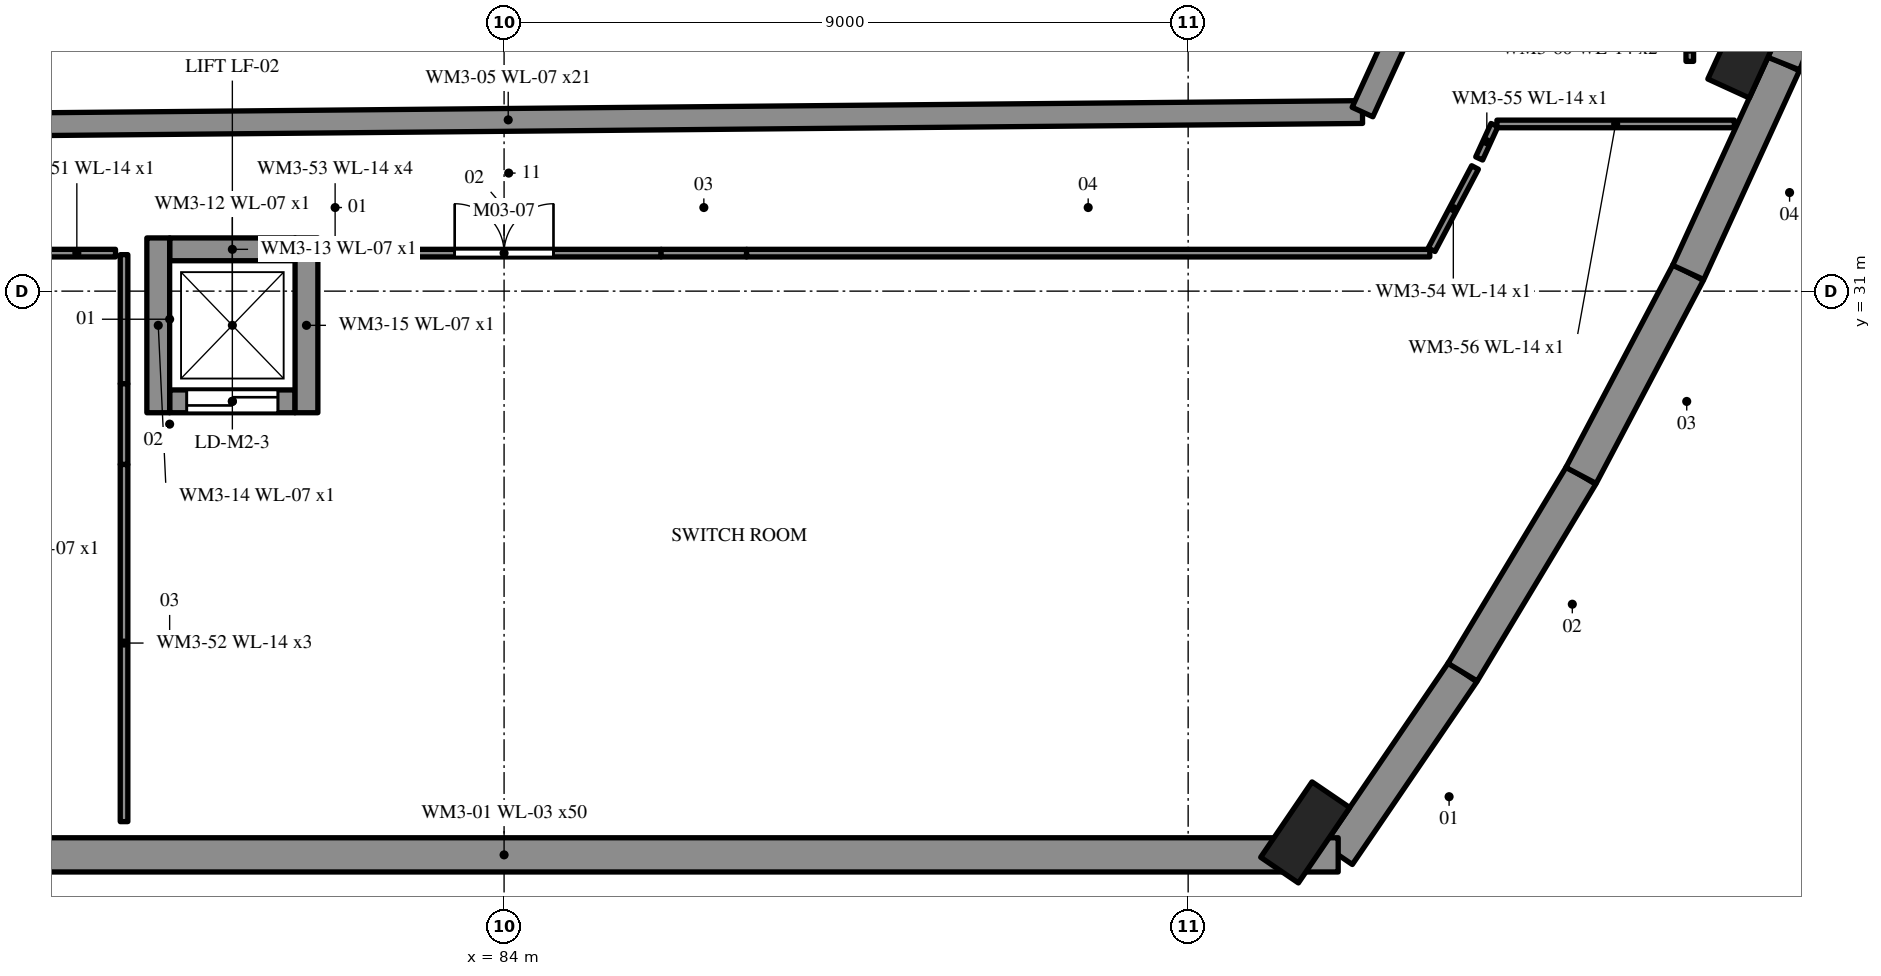
"""IFC4 building model, lengths in metres.
Left out: names, types, materials, properties, quantities, classifications, styles, units other than length and angle.
Written with IfcOpenShell. Run it as: python <this file> out.ifc"""

import sys

from ifc_helpers import new_model, si_unit, direction, frame, frame_2d, origin, origin_2d, place, context, subcontext, project, spatial, polyline, rectangle, outline, extrude, element, fill, save


model = new_model("IFC4")
c1 = context("Model", 3, precision=1e-05, world=origin(), true_north=direction((0.0, 1.0)))
c2 = subcontext(c1, "Body", "Model", "MODEL_VIEW")
j1 = project(units=[si_unit("LENGTHUNIT", "METRE"), si_unit("PLANEANGLEUNIT", "RADIAN")], contexts=[c1])
p1 = place(None, origin())
s1 = spatial("IfcSite", under=j1, at=p1, CompositionType="ELEMENT")
p2 = place(p1, origin())
s2 = spatial("IfcBuilding", under=s1, at=p2, CompositionType="ELEMENT")
p3 = place(p2, frame((0.0, 0.0, 14.8)))
s3 = spatial("IfcBuildingStorey", under=s2, at=p3, CompositionType="ELEMENT", Elevation=14.8)
p4 = place(p3, frame((94.974, 23.583, 0.0), z_axis=(0.0, 0.0, 1.0), x_axis=(0.5629642644, 0.826481238147, 0.0)))
e1 = element("IfcWall", 1, at=p4, inside=s3, PredefinedType="SOLIDWALL", context=c2, shape_type="SweptSolid", body=[
    extrude(outline(polyline([(0.0, 0.0), (2.908, 0.0), (2.908, 2.949), (0.086, 3.823), (0.0, 3.849), (0.0, 0.0)])), frame((0.0, 0.225, 0.0), z_axis=(0.0, -1.0, 0.0), x_axis=(1.0, 0.0, 0.0)), (0.0, 0.0, 1.0), 0.45),
])
p5 = place(p3, frame((96.611, 25.986, 0.0), z_axis=(0.0, 0.0, 1.0), x_axis=(0.515636119523, 0.856807675177, 0.0)))
e2 = element("IfcWall", 2, at=p5, inside=s3, PredefinedType="SOLIDWALL", context=c2, shape_type="SweptSolid", body=[
    extrude(outline(polyline([(0.0, 0.0), (3.021, 0.0), (3.021, 2.045), (2.981, 2.057), (0.0, 2.945), (0.0, 0.0)])), frame((0.0, 0.225, 0.0), z_axis=(0.0, -1.0, 0.0), x_axis=(1.0, 0.0, 0.0)), (0.0, 0.0, 1.0), 0.45),
])
p6 = place(p3, frame((98.169, 28.575, 0.0), z_axis=(0.0, 0.0, 1.0), x_axis=(0.466728769487, 0.884400506407, 0.0)))
e3 = element("IfcWall", 3, at=p6, inside=s3, PredefinedType="SOLIDWALL", context=c2, shape_type="SweptSolid", body=[
    extrude(outline(polyline([(0.0, 0.0), (3.021, 0.0), (3.021, 2.917), (2.948, 2.896), (0.0, 2.041), (0.0, 0.0)])), frame((0.0, 0.225, 0.0), z_axis=(0.0, -1.0, 0.0), x_axis=(1.0, 0.0, 0.0)), (0.0, 0.0, 1.0), 0.45),
])
p7 = place(p3, frame((99.579, 31.246, 0.0), z_axis=(0.0, 0.0, 1.0), x_axis=(0.416407051835, 0.909178292296, 0.0)))
e4 = element("IfcWall", 4, at=p7, inside=s3, PredefinedType="SOLIDWALL", context=c2, shape_type="SweptSolid", body=[
    extrude(outline(polyline([(0.0, 0.0), (3.021, 0.0), (3.021, 3.826), (2.922, 3.796), (2.819, 3.766), (0.059, 2.941), (0.0, 2.921), (0.0, 0.0)])), frame((0.0, 0.225, 0.0), z_axis=(0.0, -1.0, 0.0), x_axis=(1.0, 0.0, 0.0)), (0.0, 0.0, 1.0), 0.45),
])
p8 = place(p3, frame((100.837, 33.993, 0.0), z_axis=(0.0, 0.0, 1.0), x_axis=(0.366920100653, 0.930252460215, 0.0)))
e5 = element("IfcWall", 5, at=p8, inside=s3, PredefinedType="SOLIDWALL", context=c2, shape_type="SweptSolid", body=[
    extrude(outline(polyline([(0.0, 0.0), (2.752, 0.0), (2.752, 3.009), (2.624, 3.051), (0.186, 3.848), (0.097, 3.877), (0.0, 3.83), (0.0, 0.0)])), frame((0.0, 0.225, 0.0), z_axis=(0.0, -1.0, 0.0), x_axis=(1.0, 0.0, 0.0)), (0.0, 0.0, 1.0), 0.45),
])
p9 = place(p3, frame((73.026, 23.583, 0.0), z_axis=(0.0, 0.0, 1.0), x_axis=(1.0, 0.0, 0.0)))
e6 = element("IfcWall", 6, at=p9, inside=s3, PredefinedType="SOLIDWALL", context=c2, shape_type="SweptSolid", body=[
    extrude(outline(polyline([(0.0, 0.0), (21.948, 0.0), (21.948, 3.808), (21.824, 3.808), (21.587, 3.808), (0.361, 3.808), (0.114, 3.808), (0.0, 3.808), (0.0, 0.0)])), frame((0.0, 0.225, 0.0), z_axis=(0.0, -1.0, 0.0), x_axis=(1.0, 0.0, 0.0)), (0.0, 0.0, 1.0), 0.45),
])
p10 = place(p3, frame((72.815, 33.15, 0.0), z_axis=(0.0, 0.0, 1.0), x_axis=(0.999957788763, 0.009188073348, 0.0)))
e7 = element("IfcWall", 7, at=p10, inside=s3, PredefinedType="SHEAR", context=c2, shape_type="SweptSolid", body=[
    extrude(outline(polyline([(0.0, 0.0), (22.479, 0.0), (22.479, 5.858), (15.985, 8.528), (15.177, 8.853), (14.37, 9.179), (13.458, 9.548), (13.076, 9.791), (12.695, 10.024), (12.567, 10.103), (12.335, 10.244), (12.236, 10.303), (12.081, 10.37), (11.991, 10.369), (11.926, 10.369), (11.836, 10.368), (11.681, 10.367), (10.683, 10.361), (10.522, 10.36), (10.433, 10.359), (10.361, 10.359), (10.243, 10.358), (10.111, 10.29), (10.002, 10.224), (9.76, 10.078), (9.604, 9.978), (9.201, 9.734), (8.798, 9.479), (7.653, 9.004), (6.754, 8.631), (5.855, 8.258), (0.0, 5.797), (0.0, 0.0)])), frame((0.0, 0.15, 0.0), z_axis=(0.0, -1.0, 0.0), x_axis=(1.0, 0.0, 0.0)), (0.0, 0.0, 1.0), 0.3),
])
p11 = place(p3, frame((95.294, 33.356, 0.0), z_axis=(0.0, 0.0, 1.0), x_axis=(0.416368255987, 0.909196059938, 0.0)))
e8 = element("IfcWall", 8, at=p11, inside=s3, PredefinedType="SHEAR", context=c2, shape_type="SweptSolid", body=[
    extrude(outline(polyline([(0.0, 0.0), (2.759, 0.0), (2.759, 5.412), (2.657, 5.448), (2.56, 5.481), (0.869, 6.062), (0.8, 6.086), (0.731, 6.065), (0.669, 6.046), (0.601, 6.026), (0.532, 6.005), (0.0, 5.847), (0.0, 0.0)])), frame((0.0, 0.15, 0.0), z_axis=(0.0, -1.0, 0.0), x_axis=(1.0, 0.0, 0.0)), (0.0, 0.0, 1.0), 0.3),
])
p12 = place(p3, frame((94.54, 23.878, 0.0), z_axis=(0.0, 0.0, 1.0), x_axis=(0.562978035902, 0.82647185741, 0.0)))
e9 = element("IfcColumn", 9, at=p12, inside=s3, PredefinedType="PILASTER", context=c2, shape_type="SweptSolid", body=[
    extrude(rectangle(XDim=1.2, YDim=0.6, at=origin_2d()), origin(), (0.0, 0.0, 1.0), 3.059),
])
p13 = place(p3, frame((100.36, 34.212, 0.0), z_axis=(0.0, 0.0, 1.0), x_axis=(0.416344267901, 0.90920704495, 0.0)))
e10 = element("IfcColumn", 10, at=p13, inside=s3, PredefinedType="PILASTER", context=c2, shape_type="SweptSolid", body=[
    extrude(rectangle(XDim=1.2, YDim=0.6, at=origin_2d()), origin(), (0.0, 0.0, 1.0), 3.06),
])
p14 = place(p3, frame((79.6, 29.55, 0.0), z_axis=(0.0, 0.0, 1.0), x_axis=(1.0, 0.0, 0.0)))
e11 = element("IfcWall", 11, at=p14, inside=s3, PredefinedType="SHEAR", context=c2, shape_type="SweptSolid", body=[
    extrude(rectangle(XDim=1.65, YDim=0.3, at=frame_2d((0.825, 0.0))), origin(), (0.0, 0.0, 1.0), 4.2),
])
p15 = place(p14, frame((0.225, 0.0, 0.0)))
e12 = element("IfcOpeningElement", 12, at=p15, cuts=e11, PredefinedType="OPENING", context=c2, shape_type="SweptSolid", body=[
    extrude(rectangle(XDim=1.2, YDim=2.2, at=frame_2d((0.6, 1.1))), frame((0.0, 0.16, 0.0), z_axis=(0.0, -1.0, 0.0), x_axis=(1.0, 0.0, 0.0)), (0.0, 0.0, 1.0), 0.32),
])
p16 = place(p3, frame((81.25, 31.55, 0.0), z_axis=(0.0, 0.0, 1.0), x_axis=(-1.0, 0.0, 0.0)))
e13 = element("IfcWall", 13, at=p16, inside=s3, PredefinedType="SHEAR", context=c2, shape_type="SweptSolid", body=[
    extrude(rectangle(XDim=1.65, YDim=0.3, at=frame_2d((0.825, 0.0))), origin(), (0.0, 0.0, 1.0), 4.2),
])
for number, where, z_axis, x_axis in (
    (14, (79.45, 31.7, 0.0), (0.0, 0.0, 1.0), (0.0, -1.0, 0.0)),
    (15, (81.4, 29.4, 0.0), (0.0, 0.0, 1.0), (0.0, 1.0, 0.0)),
):
    element("IfcWall", number, at=place(p3, frame(where, z_axis=z_axis, x_axis=x_axis)), inside=s3, PredefinedType="SHEAR", context=c2, shape_type="SweptSolid", body=[
        extrude(rectangle(XDim=2.3, YDim=0.3, at=frame_2d((1.15, 0.0))), origin(), (0.0, 0.0, 1.0), 4.2),
    ])
p17 = place(p3, frame((77.87, 31.5, 0.0), z_axis=(0.0, 0.0, 1.0), x_axis=(1.0, 0.0, 0.0)))
e16 = element("IfcWall", 16, at=p17, inside=s3, PredefinedType="PARTITIONING", context=c2, shape_type="SweptSolid", body=[
    extrude(outline(polyline([(0.0, 0.0), (1.018, 0.0), (1.018, 7.732), (0.763, 7.576), (0.509, 7.42), (0.254, 7.264), (0.0, 7.108), (0.0, 0.0)])), frame((0.0, 0.05, 0.0), z_axis=(0.0, -1.0, 0.0), x_axis=(1.0, 0.0, 0.0)), (0.0, 0.0, 1.0), 0.1),
])
p18 = place(p3, frame((79.0, 31.48, 0.0), z_axis=(0.0, 0.0, 1.0), x_axis=(0.0, -1.0, 0.0)))
e17 = element("IfcWall", 17, at=p18, inside=s3, PredefinedType="PARTITIONING", context=c2, shape_type="SweptSolid", body=[
    extrude(outline(polyline([(0.0, 0.0), (1.699, 0.0), (1.699, 7.749), (1.416, 7.759), (1.133, 7.77), (0.85, 7.78), (0.566, 7.788), (0.283, 7.794), (0.0, 7.8), (0.0, 0.0)])), frame((0.0, 0.05, 0.0), z_axis=(0.0, -1.0, 0.0), x_axis=(1.0, 0.0, 0.0)), (0.0, 0.0, 1.0), 0.1),
])
p19 = place(p3, frame((79.0, 29.781, 0.0), z_axis=(0.0, 0.0, 1.0), x_axis=(0.0, -1.0, 0.0)))
e18 = element("IfcWall", 18, at=p19, inside=s3, PredefinedType="PARTITIONING", context=c2, shape_type="SweptSolid", body=[
    extrude(rectangle(XDim=1.062, YDim=0.1, at=frame_2d((0.531, 0.0))), origin(), (0.0, 0.0, 1.0), 2.008),
])
p20 = place(p3, frame((79.0, 28.719, 0.0), z_axis=(0.0, 0.0, 1.0), x_axis=(0.0, -1.0, 0.0)))
e19 = element("IfcWall", 19, at=p20, inside=s3, PredefinedType="PARTITIONING", context=c2, shape_type="SweptSolid", body=[
    extrude(outline(polyline([(0.0, 0.0), (4.699, 0.0), (4.699, 4.203), (4.438, 4.379), (4.177, 4.555), (3.916, 4.73), (3.655, 4.906), (3.394, 5.081), (3.133, 5.257), (2.872, 5.433), (2.611, 5.608), (2.35, 5.784), (2.089, 5.96), (1.827, 6.135), (1.566, 6.311), (1.305, 6.487), (1.044, 6.662), (0.783, 6.838), (0.522, 7.014), (0.261, 7.189), (0.0, 7.365), (0.0, 0.0)])), frame((0.0, 0.05, 0.0), z_axis=(0.0, -1.0, 0.0), x_axis=(1.0, 0.0, 0.0)), (0.0, 0.0, 1.0), 0.1),
])
p21 = place(p3, frame((81.62, 31.5, 0.0), z_axis=(0.0, 0.0, 1.0), x_axis=(1.0, 0.0, 0.0)))
e20 = element("IfcWall", 20, at=p21, inside=s3, PredefinedType="PARTITIONING", context=c2, shape_type="SweptSolid", body=[
    extrude(rectangle(XDim=0.314, YDim=0.1, at=frame_2d((0.157, 0.0))), origin(), (0.0, 0.0, 1.0), 2.008),
])
p22 = place(p3, frame((81.934, 31.5, 0.0), z_axis=(0.0, 0.0, 1.0), x_axis=(1.0, 0.0, 0.0)))
e21 = element("IfcWall", 21, at=p22, inside=s3, PredefinedType="PARTITIONING", context=c2, shape_type="SweptSolid", body=[
    extrude(outline(polyline([(0.0, 0.0), (4.132, 0.0), (4.132, 9.236), (3.874, 9.236), (3.615, 9.236), (3.357, 9.236), (3.099, 9.236), (2.841, 9.236), (2.582, 9.236), (2.324, 9.236), (2.066, 9.236), (1.808, 9.236), (1.549, 9.236), (1.291, 9.236), (1.033, 9.236), (0.775, 9.236), (0.516, 9.236), (0.258, 9.236), (0.0, 9.236), (0.0, 0.0)])), frame((0.0, 0.05, 0.0), z_axis=(0.0, -1.0, 0.0), x_axis=(1.0, 0.0, 0.0)), (0.0, 0.0, 1.0), 0.1),
])
p23 = place(p22, frame((1.416, 0.0, 0.0)))
e22 = element("IfcOpeningElement", 22, at=p23, cuts=e21, PredefinedType="OPENING", context=c2, shape_type="SweptSolid", body=[
    extrude(rectangle(XDim=1.3, YDim=2.1, at=frame_2d((0.65, 1.05))), frame((0.0, 0.06, 0.0), z_axis=(0.0, -1.0, 0.0), x_axis=(1.0, 0.0, 0.0)), (0.0, 0.0, 1.0), 0.12),
])
p24 = place(p3, frame((86.066, 31.5, 0.0), z_axis=(0.0, 0.0, 1.0), x_axis=(1.0, 0.0, 0.0)))
e23 = element("IfcWall", 23, at=p24, inside=s3, PredefinedType="PARTITIONING", context=c2, shape_type="SweptSolid", body=[
    extrude(rectangle(XDim=1.125, YDim=0.1, at=frame_2d((0.562, 0.0))), origin(), (0.0, 0.0, 1.0), 2.008),
])
p25 = place(p3, frame((87.19, 31.5, 0.0), z_axis=(0.0, 0.0, 1.0), x_axis=(1.0, 0.0, 0.0)))
e24 = element("IfcWall", 24, at=p25, inside=s3, PredefinedType="PARTITIONING", context=c2, shape_type="SweptSolid", body=[
    extrude(outline(polyline([(0.0, 0.0), (8.989, 0.0), (8.989, 4.541), (8.732, 4.646), (8.475, 4.752), (8.218, 4.857), (7.961, 4.962), (7.705, 5.067), (7.448, 5.173), (7.191, 5.278), (6.934, 5.383), (6.677, 5.488), (6.42, 5.594), (6.164, 5.699), (5.907, 5.804), (5.65, 5.909), (5.393, 6.015), (5.136, 6.12), (4.88, 6.225), (4.623, 6.33), (4.366, 6.436), (4.109, 6.541), (3.852, 6.646), (3.595, 6.751), (3.339, 6.857), (3.082, 7.02), (2.825, 7.178), (2.568, 7.335), (2.311, 7.493), (2.055, 7.65), (1.798, 7.808), (1.541, 7.965), (1.284, 8.123), (1.027, 8.28), (0.77, 8.438), (0.514, 8.594), (0.257, 8.749), (0.0, 8.904), (0.0, 0.0)])), frame((0.0, 0.05, 0.0), z_axis=(0.0, -1.0, 0.0), x_axis=(1.0, 0.0, 0.0)), (0.0, 0.0, 1.0), 0.1),
])
p26 = place(p3, frame((96.203, 31.545, 0.0), z_axis=(0.0, 0.0, 1.0), x_axis=(0.466814963205, 0.884355013627, 0.0)))
e25 = element("IfcWall", 25, at=p26, inside=s3, PredefinedType="PARTITIONING", context=c2, shape_type="SweptSolid", body=[
    extrude(outline(polyline([(0.0, 0.0), (1.224, 0.0), (1.224, 4.892), (0.918, 4.811), (0.612, 4.731), (0.306, 4.647), (0.0, 4.556), (0.0, 0.0)])), frame((0.0, 0.05, 0.0), z_axis=(0.0, -1.0, 0.0), x_axis=(1.0, 0.0, 0.0)), (0.0, 0.0, 1.0), 0.1),
])
p27 = place(p3, frame((96.829, 32.746, 0.0), z_axis=(0.0, 0.0, 1.0), x_axis=(0.416272443585, 0.909239931323, 0.0)))
e26 = element("IfcWall", 26, at=p27, inside=s3, PredefinedType="PARTITIONING", context=c2, shape_type="SweptSolid", body=[
    extrude(outline(polyline([(0.0, 0.0), (0.484, 0.0), (0.484, 5.075), (0.242, 5.003), (0.0, 4.931), (0.0, 0.0)])), frame((0.0, 0.05, 0.0), z_axis=(0.0, -1.0, 0.0), x_axis=(1.0, 0.0, 0.0)), (0.0, 0.0, 1.0), 0.1),
])
p28 = place(p3, frame((97.062, 33.2, 0.0), z_axis=(0.0, 0.0, 1.0), x_axis=(1.0, 0.0, 0.0)))
e27 = element("IfcWall", 27, at=p28, inside=s3, PredefinedType="PARTITIONING", context=c2, shape_type="SweptSolid", body=[
    extrude(outline(polyline([(0.0, 0.0), (3.124, 0.0), (3.134, 3.77), (2.873, 3.878), (2.611, 3.987), (2.35, 4.095), (2.089, 4.204), (1.828, 4.313), (1.567, 4.421), (1.306, 4.53), (1.045, 4.639), (0.783, 4.747), (0.522, 4.856), (0.261, 4.965), (0.0, 5.073), (0.0, 0.0)])), frame((0.0, 0.05, 0.0), z_axis=(0.0, -1.0, 0.0), x_axis=(1.0, 0.0, 0.0)), (0.0, 0.0, 1.0), 0.1),
])
p29 = place(p3, frame((99.6, 34.023, 0.0), z_axis=(0.0, 0.0, 1.0), x_axis=(0.0, 1.0, 0.0)))
e28 = element("IfcWall", 28, at=p29, inside=s3, PredefinedType="PARTITIONING", context=c2, shape_type="SweptSolid", body=[
    extrude(rectangle(XDim=0.32, YDim=0.1, at=frame_2d((0.16, 0.0))), origin(), (0.0, 0.0, 1.0), 2.075),
])
p30 = place(p15, origin())
e29 = element("IfcDoor", 29, at=p30, inside=s3, OperationType="SLIDING_TO_LEFT", PredefinedType="DOOR", context=c2, shape_type="SweptSolid", body=[
    extrude(rectangle(XDim=1.2, YDim=2.2, at=frame_2d((0.6, 1.1))), frame((0.0, 0.025, 0.0), z_axis=(0.0, -1.0, 0.0), x_axis=(1.0, 0.0, 0.0)), (0.0, 0.0, 1.0), 0.05),
])
fill(e12, e29)
p31 = place(p23, origin())
e30 = element("IfcDoor", 30, at=p31, inside=s3, OperationType="DOUBLE_DOOR_SINGLE_SWING", PredefinedType="DOOR", context=c2, shape_type="SweptSolid", body=[
    extrude(rectangle(XDim=1.3, YDim=2.1, at=frame_2d((0.65, 1.05))), frame((0.0, 0.025, 0.0), z_axis=(0.0, -1.0, 0.0), x_axis=(1.0, 0.0, 0.0)), (0.0, 0.0, 1.0), 0.05),
])
fill(e22, e30)
save(model, sys.argv[1])
